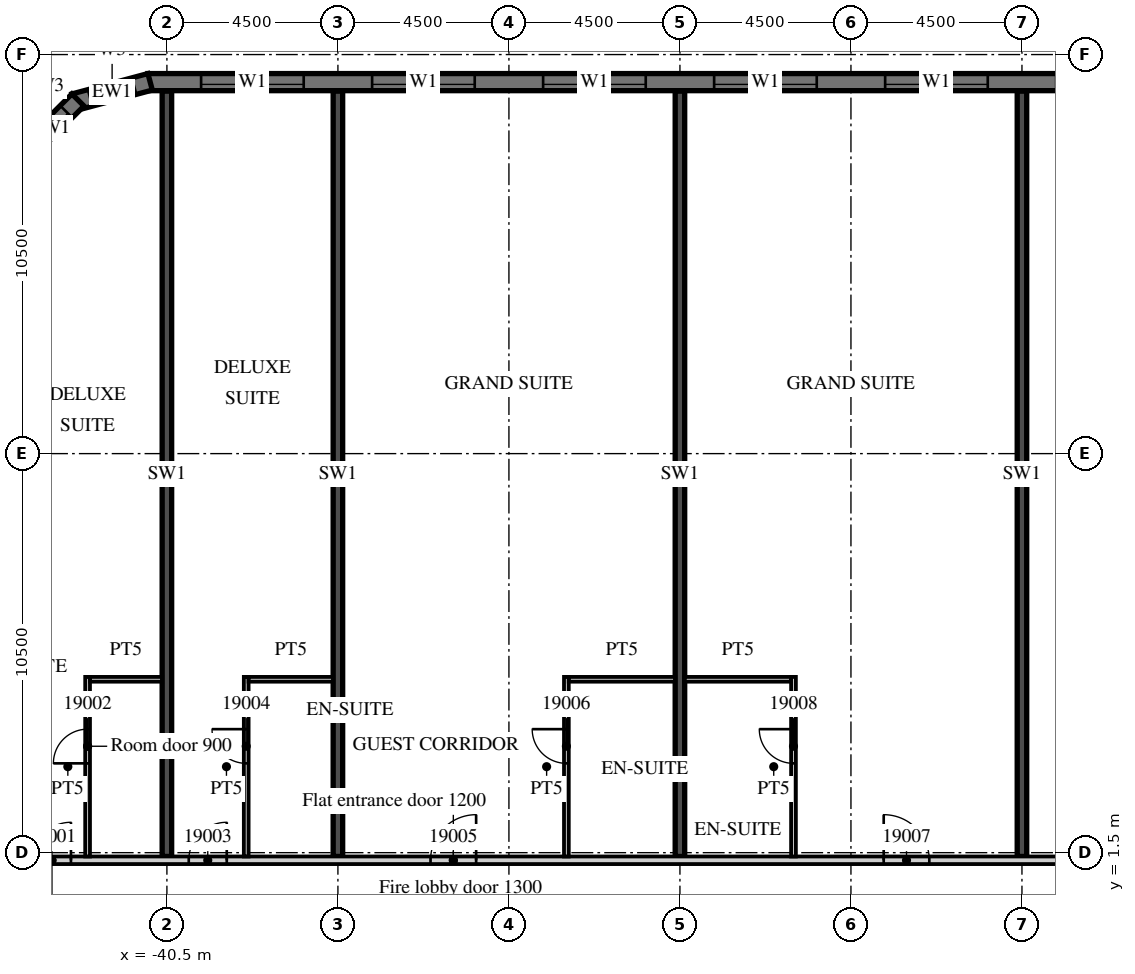
"""IFC4 building model, lengths in metres.
Left out: names, types, materials, properties, quantities, classifications, styles, units other than length and angle.
Written with IfcOpenShell. Run it as: python <this file> out.ifc"""

import sys

from ifc_helpers import new_model, si_unit, direction, frame, frame_2d, origin, place, context, subcontext, project, spatial, polyline, rectangle, outline, extrude, element, fill, save


model = new_model("IFC4")
c1 = context("Model", 3, precision=1e-05, world=origin(), true_north=direction((0.0, 1.0)))
c2 = subcontext(c1, "Body", "Model", "MODEL_VIEW")
j1 = project(units=[si_unit("LENGTHUNIT", "METRE"), si_unit("PLANEANGLEUNIT", "RADIAN")], contexts=[c1])
p1 = place(None, origin())
s1 = spatial("IfcSite", under=j1, at=p1, CompositionType="ELEMENT")
p2 = place(p1, origin())
s2 = spatial("IfcBuilding", under=s1, at=p2, CompositionType="ELEMENT")
p3 = place(p2, frame((0.0, 0.0, 93.0)))
s3 = spatial("IfcBuildingStorey", under=s2, at=p3, CompositionType="ELEMENT", Elevation=93.0)
for number, where, z_axis, x_axis in (
    (1, (-40.5, 1.4, 0.0), (0.0, 0.0, 1.0), (0.0, 1.0, 0.0)),
    (2, (-36.0, 1.4, 0.0), (0.0, 0.0, 1.0), (0.0, 1.0, 0.0)),
    (3, (-27.0, 1.4, 0.0), (0.0, 0.0, 1.0), (0.0, 1.0, 0.0)),
    (4, (-18.0, 1.4, 0.0), (0.0, 0.0, 1.0), (0.0, 1.0, 0.0)),
):
    element("IfcWall", number, at=place(p3, frame(where, z_axis=z_axis, x_axis=x_axis)), inside=s3, PredefinedType="SHEAR", context=c2, shape_type="SweptSolid", body=[
        extrude(rectangle(XDim=20.14, YDim=0.25, at=frame_2d((10.07, 0.0))), origin(), (0.0, 0.0, 1.0), 3.3),
    ])
p4 = place(p3, frame((13.5, 21.775, 0.0), z_axis=(0.0, 0.0, 1.0), x_axis=(-1.0, 0.0, 0.0)))
e5 = element("IfcWall", 5, at=p4, inside=s3, PredefinedType="SOLIDWALL", context=c2, shape_type="SweptSolid", body=[
    extrude(rectangle(XDim=54.5, YDim=0.45, at=frame_2d((27.25, 0.0))), origin(), (0.0, 0.0, 1.0), 3.02),
])
p5 = place(p4, frame((0.9, 0.0, 0.45)))
e6 = element("IfcOpeningElement", 6, at=p5, cuts=e5, PredefinedType="OPENING", context=c2, shape_type="SweptSolid", body=[
    extrude(rectangle(XDim=2.7, YDim=2.25, at=frame_2d((1.35, 1.125))), frame((0.0, 0.235, 0.0), z_axis=(0.0, -1.0, 0.0), x_axis=(1.0, 0.0, 0.0)), (0.0, 0.0, 1.0), 0.47),
])
p6 = place(p4, frame((5.4, 0.0, 0.45)))
e7 = element("IfcOpeningElement", 7, at=p6, cuts=e5, PredefinedType="OPENING", context=c2, shape_type="SweptSolid", body=[
    extrude(rectangle(XDim=2.7, YDim=2.25, at=frame_2d((1.35, 1.125))), frame((0.0, 0.235, 0.0), z_axis=(0.0, -1.0, 0.0), x_axis=(1.0, 0.0, 0.0)), (0.0, 0.0, 1.0), 0.47),
])
p7 = place(p4, frame((9.9, 0.0, 0.45)))
e8 = element("IfcOpeningElement", 8, at=p7, cuts=e5, PredefinedType="OPENING", context=c2, shape_type="SweptSolid", body=[
    extrude(rectangle(XDim=2.7, YDim=2.25, at=frame_2d((1.35, 1.125))), frame((0.0, 0.235, 0.0), z_axis=(0.0, -1.0, 0.0), x_axis=(1.0, 0.0, 0.0)), (0.0, 0.0, 1.0), 0.47),
])
p8 = place(p4, frame((14.4, 0.0, 0.45)))
e9 = element("IfcOpeningElement", 9, at=p8, cuts=e5, PredefinedType="OPENING", context=c2, shape_type="SweptSolid", body=[
    extrude(rectangle(XDim=2.7, YDim=2.25, at=frame_2d((1.35, 1.125))), frame((0.0, 0.235, 0.0), z_axis=(0.0, -1.0, 0.0), x_axis=(1.0, 0.0, 0.0)), (0.0, 0.0, 1.0), 0.47),
])
p9 = place(p4, frame((18.9, 0.0, 0.45)))
e10 = element("IfcOpeningElement", 10, at=p9, cuts=e5, PredefinedType="OPENING", context=c2, shape_type="SweptSolid", body=[
    extrude(rectangle(XDim=2.7, YDim=2.25, at=frame_2d((1.35, 1.125))), frame((0.0, 0.235, 0.0), z_axis=(0.0, -1.0, 0.0), x_axis=(1.0, 0.0, 0.0)), (0.0, 0.0, 1.0), 0.47),
])
p10 = place(p4, frame((23.4, 0.0, 0.45)))
e11 = element("IfcOpeningElement", 11, at=p10, cuts=e5, PredefinedType="OPENING", context=c2, shape_type="SweptSolid", body=[
    extrude(rectangle(XDim=2.7, YDim=2.25, at=frame_2d((1.35, 1.125))), frame((0.0, 0.235, 0.0), z_axis=(0.0, -1.0, 0.0), x_axis=(1.0, 0.0, 0.0)), (0.0, 0.0, 1.0), 0.47),
])
p11 = place(p4, frame((27.9, 0.0, 0.45)))
e12 = element("IfcOpeningElement", 12, at=p11, cuts=e5, PredefinedType="OPENING", context=c2, shape_type="SweptSolid", body=[
    extrude(rectangle(XDim=2.7, YDim=2.25, at=frame_2d((1.35, 1.125))), frame((0.0, 0.235, 0.0), z_axis=(0.0, -1.0, 0.0), x_axis=(1.0, 0.0, 0.0)), (0.0, 0.0, 1.0), 0.47),
])
p12 = place(p4, frame((32.4, 0.0, 0.45)))
e13 = element("IfcOpeningElement", 13, at=p12, cuts=e5, PredefinedType="OPENING", context=c2, shape_type="SweptSolid", body=[
    extrude(rectangle(XDim=2.7, YDim=2.25, at=frame_2d((1.35, 1.125))), frame((0.0, 0.235, 0.0), z_axis=(0.0, -1.0, 0.0), x_axis=(1.0, 0.0, 0.0)), (0.0, 0.0, 1.0), 0.47),
])
p13 = place(p4, frame((36.9, 0.0, 0.45)))
e14 = element("IfcOpeningElement", 14, at=p13, cuts=e5, PredefinedType="OPENING", context=c2, shape_type="SweptSolid", body=[
    extrude(rectangle(XDim=2.7, YDim=2.25, at=frame_2d((1.35, 1.125))), frame((0.0, 0.235, 0.0), z_axis=(0.0, -1.0, 0.0), x_axis=(1.0, 0.0, 0.0)), (0.0, 0.0, 1.0), 0.47),
])
p14 = place(p4, frame((41.4, 0.0, 0.45)))
e15 = element("IfcOpeningElement", 15, at=p14, cuts=e5, PredefinedType="OPENING", context=c2, shape_type="SweptSolid", body=[
    extrude(rectangle(XDim=2.7, YDim=2.25, at=frame_2d((1.35, 1.125))), frame((0.0, 0.235, 0.0), z_axis=(0.0, -1.0, 0.0), x_axis=(1.0, 0.0, 0.0)), (0.0, 0.0, 1.0), 0.47),
])
p15 = place(p4, frame((45.9, 0.0, 0.45)))
e16 = element("IfcOpeningElement", 16, at=p15, cuts=e5, PredefinedType="OPENING", context=c2, shape_type="SweptSolid", body=[
    extrude(rectangle(XDim=2.7, YDim=2.25, at=frame_2d((1.35, 1.125))), frame((0.0, 0.235, 0.0), z_axis=(0.0, -1.0, 0.0), x_axis=(1.0, 0.0, 0.0)), (0.0, 0.0, 1.0), 0.47),
])
p16 = place(p4, frame((50.4, 0.0, 0.45)))
e17 = element("IfcOpeningElement", 17, at=p16, cuts=e5, PredefinedType="OPENING", context=c2, shape_type="SweptSolid", body=[
    extrude(rectangle(XDim=2.7, YDim=2.25, at=frame_2d((1.35, 1.125))), frame((0.0, 0.235, 0.0), z_axis=(0.0, -1.0, 0.0), x_axis=(1.0, 0.0, 0.0)), (0.0, 0.0, 1.0), 0.47),
])
p17 = place(p3, frame((-40.942, 21.783, 0.0), z_axis=(0.0, 0.0, 1.0), x_axis=(-0.965926999034, -0.25881466832, 0.0)))
e18 = element("IfcWall", 18, at=p17, inside=s3, PredefinedType="SOLIDWALL", context=c2, shape_type="SweptSolid", body=[
    extrude(outline(polyline([(0.0, -0.225), (2.071, -0.225), (1.95, 0.225), (0.121, 0.225), (0.0, -0.225)])), origin(), (0.0, 0.0, 1.0), 3.02),
])
p18 = place(p17, frame((0.435, 0.0, 0.45)))
e19 = element("IfcOpeningElement", 19, at=p18, cuts=e18, PredefinedType="OPENING", context=c2, shape_type="SweptSolid", body=[
    extrude(rectangle(XDim=1.2, YDim=2.25, at=frame_2d((0.6, 1.125))), frame((0.0, 0.235, 0.0), z_axis=(0.0, -1.0, 0.0), x_axis=(1.0, 0.0, 0.0)), (0.0, 0.0, 1.0), 0.47),
])
p19 = place(p3, frame((-42.841, 21.305, 0.0), z_axis=(0.0, 0.0, 1.0), x_axis=(-0.707106781187, -0.707106781187, 0.0)))
e20 = element("IfcWall", 20, at=p19, inside=s3, PredefinedType="SOLIDWALL", context=c2, shape_type="SweptSolid", body=[
    extrude(outline(polyline([(0.0, -0.225), (2.071, -0.225), (1.95, 0.225), (0.121, 0.225), (0.0, -0.225)])), origin(), (0.0, 0.0, 1.0), 3.02),
])
p20 = place(p19, frame((0.435, 0.0, 0.45)))
e21 = element("IfcOpeningElement", 21, at=p20, cuts=e20, PredefinedType="OPENING", context=c2, shape_type="SweptSolid", body=[
    extrude(rectangle(XDim=1.2, YDim=2.25, at=frame_2d((0.6, 1.125))), frame((0.0, 0.235, 0.0), z_axis=(0.0, -1.0, 0.0), x_axis=(1.0, 0.0, 0.0)), (0.0, 0.0, 1.0), 0.47),
])
p21 = place(p3, frame((-44.55, 1.3, 0.0), z_axis=(0.0, 0.0, 1.0), x_axis=(1.0, 0.0, 0.0)))
e22 = element("IfcWall", 22, at=p21, inside=s3, PredefinedType="PARTITIONING", context=c2, shape_type="SweptSolid", body=[
    extrude(rectangle(XDim=58.05, YDim=0.2, at=frame_2d((29.025, 0.0))), origin(), (0.0, 0.0, 1.0), 3.02),
])
p22 = place(p21, frame((0.525, 0.0, 0.0)))
e23 = element("IfcOpeningElement", 23, at=p22, cuts=e22, PredefinedType="OPENING", context=c2, shape_type="SweptSolid", body=[
    extrude(rectangle(XDim=1.0, YDim=2.1, at=frame_2d((0.5, 1.05))), frame((0.0, 0.11, 0.0), z_axis=(0.0, -1.0, 0.0), x_axis=(1.0, 0.0, 0.0)), (0.0, 0.0, 1.0), 0.22),
])
p23 = place(p21, frame((4.625, 0.0, 0.0)))
e24 = element("IfcOpeningElement", 24, at=p23, cuts=e22, PredefinedType="OPENING", context=c2, shape_type="SweptSolid", body=[
    extrude(rectangle(XDim=1.0, YDim=2.1, at=frame_2d((0.5, 1.05))), frame((0.0, 0.11, 0.0), z_axis=(0.0, -1.0, 0.0), x_axis=(1.0, 0.0, 0.0)), (0.0, 0.0, 1.0), 0.22),
])
p24 = place(p21, frame((10.987, 0.0, 0.0)))
e25 = element("IfcOpeningElement", 25, at=p24, cuts=e22, PredefinedType="OPENING", context=c2, shape_type="SweptSolid", body=[
    extrude(rectangle(XDim=1.2, YDim=2.1, at=frame_2d((0.6, 1.05))), frame((0.0, 0.11, 0.0), z_axis=(0.0, -1.0, 0.0), x_axis=(1.0, 0.0, 0.0)), (0.0, 0.0, 1.0), 0.22),
])
p25 = place(p21, frame((22.912, 0.0, 0.0)))
e26 = element("IfcOpeningElement", 26, at=p25, cuts=e22, PredefinedType="OPENING", context=c2, shape_type="SweptSolid", body=[
    extrude(rectangle(XDim=1.2, YDim=2.1, at=frame_2d((0.6, 1.05))), frame((0.0, 0.11, 0.0), z_axis=(0.0, -1.0, 0.0), x_axis=(1.0, 0.0, 0.0)), (0.0, 0.0, 1.0), 0.22),
])
p26 = place(p21, frame((28.987, 0.0, 0.0)))
e27 = element("IfcOpeningElement", 27, at=p26, cuts=e22, PredefinedType="OPENING", context=c2, shape_type="SweptSolid", body=[
    extrude(rectangle(XDim=1.2, YDim=2.1, at=frame_2d((0.6, 1.05))), frame((0.0, 0.11, 0.0), z_axis=(0.0, -1.0, 0.0), x_axis=(1.0, 0.0, 0.0)), (0.0, 0.0, 1.0), 0.22),
])
p27 = place(p21, frame((36.125, 0.0, 0.0)))
e28 = element("IfcOpeningElement", 28, at=p27, cuts=e22, PredefinedType="OPENING", context=c2, shape_type="SweptSolid", body=[
    extrude(rectangle(XDim=1.0, YDim=2.1, at=frame_2d((0.5, 1.05))), frame((0.0, 0.11, 0.0), z_axis=(0.0, -1.0, 0.0), x_axis=(1.0, 0.0, 0.0)), (0.0, 0.0, 1.0), 0.22),
])
p28 = place(p21, frame((42.975, 0.0, 0.0)))
e29 = element("IfcOpeningElement", 29, at=p28, cuts=e22, PredefinedType="OPENING", context=c2, shape_type="SweptSolid", body=[
    extrude(rectangle(XDim=1.0, YDim=2.1, at=frame_2d((0.5, 1.05))), frame((0.0, 0.11, 0.0), z_axis=(0.0, -1.0, 0.0), x_axis=(1.0, 0.0, 0.0)), (0.0, 0.0, 1.0), 0.22),
])
p29 = place(p21, frame((47.5, 0.0, 0.0)))
e30 = element("IfcOpeningElement", 30, at=p29, cuts=e22, PredefinedType="OPENING", context=c2, shape_type="SweptSolid", body=[
    extrude(rectangle(XDim=1.0, YDim=2.1, at=frame_2d((0.5, 1.05))), frame((0.0, 0.11, 0.0), z_axis=(0.0, -1.0, 0.0), x_axis=(1.0, 0.0, 0.0)), (0.0, 0.0, 1.0), 0.22),
])
p30 = place(p21, frame((49.6, 0.0, 0.0)))
e31 = element("IfcOpeningElement", 31, at=p30, cuts=e22, PredefinedType="OPENING", context=c2, shape_type="SweptSolid", body=[
    extrude(rectangle(XDim=1.0, YDim=2.1, at=frame_2d((0.5, 1.05))), frame((0.0, 0.11, 0.0), z_axis=(0.0, -1.0, 0.0), x_axis=(1.0, 0.0, 0.0)), (0.0, 0.0, 1.0), 0.22),
])
p31 = place(p21, frame((56.475, 0.0, 0.0)))
e32 = element("IfcOpeningElement", 32, at=p31, cuts=e22, PredefinedType="OPENING", context=c2, shape_type="SweptSolid", body=[
    extrude(rectangle(XDim=1.0, YDim=2.1, at=frame_2d((0.5, 1.05))), frame((0.0, 0.11, 0.0), z_axis=(0.0, -1.0, 0.0), x_axis=(1.0, 0.0, 0.0)), (0.0, 0.0, 1.0), 0.22),
])
p32 = place(p3, frame((-42.587, 1.4, 0.0), z_axis=(0.0, 0.0, 1.0), x_axis=(0.0, 1.0, 0.0)))
e33 = element("IfcWall", 33, at=p32, inside=s3, PredefinedType="PARTITIONING", context=c2, shape_type="SweptSolid", body=[
    extrude(rectangle(XDim=4.725, YDim=0.125, at=frame_2d((2.363, 0.0))), origin(), (0.0, 0.0, 1.0), 3.02),
])
p33 = place(p32, frame((2.45, 0.0, 0.0)))
e34 = element("IfcOpeningElement", 34, at=p33, cuts=e33, PredefinedType="OPENING", context=c2, shape_type="SweptSolid", body=[
    extrude(rectangle(XDim=0.9, YDim=2.1, at=frame_2d((0.45, 1.05))), frame((0.0, 0.073, 0.0), z_axis=(0.0, -1.0, 0.0), x_axis=(1.0, 0.0, 0.0)), (0.0, 0.0, 1.0), 0.145),
])
p34 = place(p3, frame((-42.525, 6.062, 0.0), z_axis=(0.0, 0.0, 1.0), x_axis=(1.0, 0.0, 0.0)))
e35 = element("IfcWall", 35, at=p34, inside=s3, PredefinedType="PARTITIONING", context=c2, shape_type="SweptSolid", body=[
    extrude(rectangle(XDim=1.9, YDim=0.125, at=frame_2d((0.95, 0.0))), origin(), (0.0, 0.0, 1.0), 3.02),
])
p35 = place(p3, frame((-38.413, 1.4, 0.0), z_axis=(0.0, 0.0, 1.0), x_axis=(0.0, 1.0, 0.0)))
e36 = element("IfcWall", 36, at=p35, inside=s3, PredefinedType="PARTITIONING", context=c2, shape_type="SweptSolid", body=[
    extrude(rectangle(XDim=4.725, YDim=0.125, at=frame_2d((2.363, 0.0))), origin(), (0.0, 0.0, 1.0), 3.02),
])
p36 = place(p35, frame((2.45, 0.0, 0.0)))
e37 = element("IfcOpeningElement", 37, at=p36, cuts=e36, PredefinedType="OPENING", context=c2, shape_type="SweptSolid", body=[
    extrude(rectangle(XDim=0.9, YDim=2.1, at=frame_2d((0.45, 1.05))), frame((0.0, 0.073, 0.0), z_axis=(0.0, -1.0, 0.0), x_axis=(1.0, 0.0, 0.0)), (0.0, 0.0, 1.0), 0.145),
])
p37 = place(p3, frame((-38.35, 6.062, 0.0), z_axis=(0.0, 0.0, 1.0), x_axis=(1.0, 0.0, 0.0)))
e38 = element("IfcWall", 38, at=p37, inside=s3, PredefinedType="PARTITIONING", context=c2, shape_type="SweptSolid", body=[
    extrude(rectangle(XDim=2.225, YDim=0.125, at=frame_2d((1.113, 0.0))), origin(), (0.0, 0.0, 1.0), 3.02),
])
p38 = place(p3, frame((-29.988, 1.4, 0.0), z_axis=(0.0, 0.0, 1.0), x_axis=(0.0, 1.0, 0.0)))
e39 = element("IfcWall", 39, at=p38, inside=s3, PredefinedType="PARTITIONING", context=c2, shape_type="SweptSolid", body=[
    extrude(rectangle(XDim=4.725, YDim=0.125, at=frame_2d((2.363, 0.0))), origin(), (0.0, 0.0, 1.0), 3.02),
])
p39 = place(p38, frame((2.45, 0.0, 0.0)))
e40 = element("IfcOpeningElement", 40, at=p39, cuts=e39, PredefinedType="OPENING", context=c2, shape_type="SweptSolid", body=[
    extrude(rectangle(XDim=0.9, YDim=2.1, at=frame_2d((0.45, 1.05))), frame((0.0, 0.073, 0.0), z_axis=(0.0, -1.0, 0.0), x_axis=(1.0, 0.0, 0.0)), (0.0, 0.0, 1.0), 0.145),
])
p40 = place(p3, frame((-29.925, 6.062, 0.0), z_axis=(0.0, 0.0, 1.0), x_axis=(1.0, 0.0, 0.0)))
e41 = element("IfcWall", 41, at=p40, inside=s3, PredefinedType="PARTITIONING", context=c2, shape_type="SweptSolid", body=[
    extrude(rectangle(XDim=2.8, YDim=0.125, at=frame_2d((1.4, 0.0))), origin(), (0.0, 0.0, 1.0), 3.02),
])
p41 = place(p3, frame((-24.012, 1.4, 0.0), z_axis=(0.0, 0.0, 1.0), x_axis=(0.0, 1.0, 0.0)))
e42 = element("IfcWall", 42, at=p41, inside=s3, PredefinedType="PARTITIONING", context=c2, shape_type="SweptSolid", body=[
    extrude(rectangle(XDim=4.725, YDim=0.125, at=frame_2d((2.363, 0.0))), origin(), (0.0, 0.0, 1.0), 3.02),
])
p42 = place(p41, frame((2.45, 0.0, 0.0)))
e43 = element("IfcOpeningElement", 43, at=p42, cuts=e42, PredefinedType="OPENING", context=c2, shape_type="SweptSolid", body=[
    extrude(rectangle(XDim=0.9, YDim=2.1, at=frame_2d((0.45, 1.05))), frame((0.0, 0.073, 0.0), z_axis=(0.0, -1.0, 0.0), x_axis=(1.0, 0.0, 0.0)), (0.0, 0.0, 1.0), 0.145),
])
p43 = place(p3, frame((-26.875, 6.062, 0.0), z_axis=(0.0, 0.0, 1.0), x_axis=(1.0, 0.0, 0.0)))
e44 = element("IfcWall", 44, at=p43, inside=s3, PredefinedType="PARTITIONING", context=c2, shape_type="SweptSolid", body=[
    extrude(rectangle(XDim=2.8, YDim=0.125, at=frame_2d((1.4, 0.0))), origin(), (0.0, 0.0, 1.0), 3.02),
])
p44 = place(p12, origin())
e45 = element("IfcWindow", 45, at=p44, inside=s3, PartitioningType="SINGLE_PANEL", PredefinedType="WINDOW", context=c2, shape_type="SweptSolid", body=[
    extrude(rectangle(XDim=2.7, YDim=2.25, at=frame_2d((1.35, 1.125))), frame((0.0, 0.09, 0.0), z_axis=(0.0, -1.0, 0.0), x_axis=(1.0, 0.0, 0.0)), (0.0, 0.0, 1.0), 0.06),
])
fill(e13, e45)
p45 = place(p13, origin())
e46 = element("IfcWindow", 46, at=p45, inside=s3, PartitioningType="SINGLE_PANEL", PredefinedType="WINDOW", context=c2, shape_type="SweptSolid", body=[
    extrude(rectangle(XDim=2.7, YDim=2.25, at=frame_2d((1.35, 1.125))), frame((0.0, 0.09, 0.0), z_axis=(0.0, -1.0, 0.0), x_axis=(1.0, 0.0, 0.0)), (0.0, 0.0, 1.0), 0.06),
])
fill(e14, e46)
p46 = place(p14, origin())
e47 = element("IfcWindow", 47, at=p46, inside=s3, PartitioningType="SINGLE_PANEL", PredefinedType="WINDOW", context=c2, shape_type="SweptSolid", body=[
    extrude(rectangle(XDim=2.7, YDim=2.25, at=frame_2d((1.35, 1.125))), frame((0.0, 0.09, 0.0), z_axis=(0.0, -1.0, 0.0), x_axis=(1.0, 0.0, 0.0)), (0.0, 0.0, 1.0), 0.06),
])
fill(e15, e47)
p47 = place(p15, origin())
e48 = element("IfcWindow", 48, at=p47, inside=s3, PartitioningType="SINGLE_PANEL", PredefinedType="WINDOW", context=c2, shape_type="SweptSolid", body=[
    extrude(rectangle(XDim=2.7, YDim=2.25, at=frame_2d((1.35, 1.125))), frame((0.0, 0.09, 0.0), z_axis=(0.0, -1.0, 0.0), x_axis=(1.0, 0.0, 0.0)), (0.0, 0.0, 1.0), 0.06),
])
fill(e16, e48)
p48 = place(p16, origin())
e49 = element("IfcWindow", 49, at=p48, inside=s3, PartitioningType="SINGLE_PANEL", PredefinedType="WINDOW", context=c2, shape_type="SweptSolid", body=[
    extrude(rectangle(XDim=2.7, YDim=2.25, at=frame_2d((1.35, 1.125))), frame((0.0, 0.09, 0.0), z_axis=(0.0, -1.0, 0.0), x_axis=(1.0, 0.0, 0.0)), (0.0, 0.0, 1.0), 0.06),
])
fill(e17, e49)
p49 = place(p18, origin())
e50 = element("IfcWindow", 50, at=p49, inside=s3, PartitioningType="SINGLE_PANEL", PredefinedType="WINDOW", context=c2, shape_type="SweptSolid", body=[
    extrude(rectangle(XDim=1.2, YDim=2.25, at=frame_2d((0.6, 1.125))), frame((0.0, 0.09, 0.0), z_axis=(0.0, -1.0, 0.0), x_axis=(1.0, 0.0, 0.0)), (0.0, 0.0, 1.0), 0.06),
])
fill(e19, e50)
p50 = place(p20, origin())
e51 = element("IfcWindow", 51, at=p50, inside=s3, PartitioningType="SINGLE_PANEL", PredefinedType="WINDOW", context=c2, shape_type="SweptSolid", body=[
    extrude(rectangle(XDim=1.2, YDim=2.25, at=frame_2d((0.6, 1.125))), frame((0.0, 0.09, 0.0), z_axis=(0.0, -1.0, 0.0), x_axis=(1.0, 0.0, 0.0)), (0.0, 0.0, 1.0), 0.06),
])
fill(e21, e51)
p51 = place(p22, origin())
e52 = element("IfcDoor", 52, at=p51, inside=s3, OperationType="SINGLE_SWING_RIGHT", PredefinedType="DOOR", context=c2, shape_type="SweptSolid", body=[
    extrude(rectangle(XDim=1.0, YDim=2.1, at=frame_2d((0.5, 1.05))), frame((0.0, 0.025, 0.0), z_axis=(0.0, -1.0, 0.0), x_axis=(1.0, 0.0, 0.0)), (0.0, 0.0, 1.0), 0.05),
])
fill(e23, e52)
p52 = place(p33, origin())
e53 = element("IfcDoor", 53, at=p52, inside=s3, OperationType="SINGLE_SWING_LEFT", PredefinedType="DOOR", context=c2, shape_type="SweptSolid", body=[
    extrude(rectangle(XDim=0.9, YDim=2.1, at=frame_2d((0.45, 1.05))), frame((0.0, 0.025, 0.0), z_axis=(0.0, -1.0, 0.0), x_axis=(1.0, 0.0, 0.0)), (0.0, 0.0, 1.0), 0.05),
])
fill(e34, e53)
p53 = place(p23, origin())
e54 = element("IfcDoor", 54, at=p53, inside=s3, OperationType="SINGLE_SWING_RIGHT", PredefinedType="DOOR", context=c2, shape_type="SweptSolid", body=[
    extrude(rectangle(XDim=1.0, YDim=2.1, at=frame_2d((0.5, 1.05))), frame((0.0, 0.025, 0.0), z_axis=(0.0, -1.0, 0.0), x_axis=(1.0, 0.0, 0.0)), (0.0, 0.0, 1.0), 0.05),
])
fill(e24, e54)
p54 = place(p36, origin())
e55 = element("IfcDoor", 55, at=p54, inside=s3, OperationType="SINGLE_SWING_RIGHT", PredefinedType="DOOR", context=c2, shape_type="SweptSolid", body=[
    extrude(rectangle(XDim=0.9, YDim=2.1, at=frame_2d((0.45, 1.05))), frame((0.0, 0.025, 0.0), z_axis=(0.0, -1.0, 0.0), x_axis=(1.0, 0.0, 0.0)), (0.0, 0.0, 1.0), 0.05),
])
fill(e37, e55)
p55 = place(p24, origin())
e56 = element("IfcDoor", 56, at=p55, inside=s3, OperationType="SINGLE_SWING_RIGHT", PredefinedType="DOOR", context=c2, shape_type="SweptSolid", body=[
    extrude(rectangle(XDim=1.2, YDim=2.1, at=frame_2d((0.6, 1.05))), frame((0.0, 0.025, 0.0), z_axis=(0.0, -1.0, 0.0), x_axis=(1.0, 0.0, 0.0)), (0.0, 0.0, 1.0), 0.05),
])
fill(e25, e56)
p56 = place(p39, origin())
e57 = element("IfcDoor", 57, at=p56, inside=s3, OperationType="SINGLE_SWING_RIGHT", PredefinedType="DOOR", context=c2, shape_type="SweptSolid", body=[
    extrude(rectangle(XDim=0.9, YDim=2.1, at=frame_2d((0.45, 1.05))), frame((0.0, 0.025, 0.0), z_axis=(0.0, -1.0, 0.0), x_axis=(1.0, 0.0, 0.0)), (0.0, 0.0, 1.0), 0.05),
])
fill(e40, e57)
p57 = place(p25, origin())
e58 = element("IfcDoor", 58, at=p57, inside=s3, OperationType="SINGLE_SWING_LEFT", PredefinedType="DOOR", context=c2, shape_type="SweptSolid", body=[
    extrude(rectangle(XDim=1.2, YDim=2.1, at=frame_2d((0.6, 1.05))), frame((0.0, 0.025, 0.0), z_axis=(0.0, -1.0, 0.0), x_axis=(1.0, 0.0, 0.0)), (0.0, 0.0, 1.0), 0.05),
])
fill(e26, e58)
p58 = place(p42, origin())
e59 = element("IfcDoor", 59, at=p58, inside=s3, OperationType="SINGLE_SWING_RIGHT", PredefinedType="DOOR", context=c2, shape_type="SweptSolid", body=[
    extrude(rectangle(XDim=0.9, YDim=2.1, at=frame_2d((0.45, 1.05))), frame((0.0, 0.025, 0.0), z_axis=(0.0, -1.0, 0.0), x_axis=(1.0, 0.0, 0.0)), (0.0, 0.0, 1.0), 0.05),
])
fill(e43, e59)
save(model, sys.argv[1])
